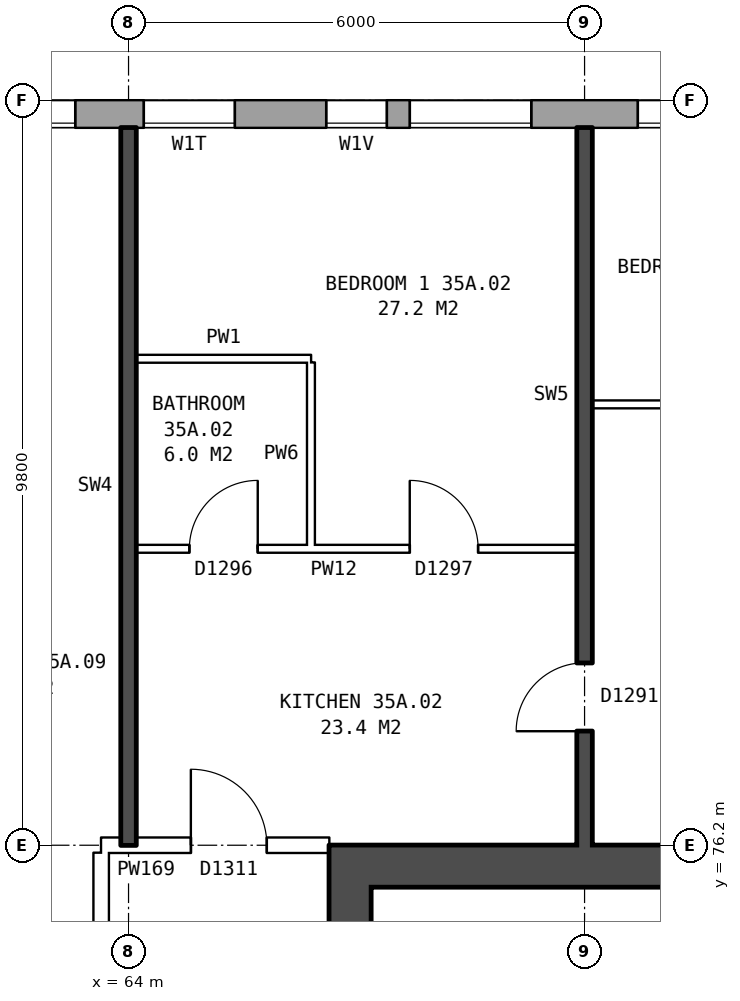
"""IFC4 building model, lengths in metres.
Left out: names, types, materials, properties, quantities, classifications, styles, units other than length and angle.
Written with IfcOpenShell. Run it as: python <this file> out.ifc"""

import sys

from ifc_helpers import new_model, si_unit, direction, frame, frame_2d, origin, place, context, subcontext, project, spatial, rectangle, extrude, element, fill, save


model = new_model("IFC4")
c1 = context("Model", 3, precision=1e-05, world=origin(), true_north=direction((0.0, 1.0)))
c2 = subcontext(c1, "Body", "Model", "MODEL_VIEW")
j1 = project(units=[si_unit("LENGTHUNIT", "METRE"), si_unit("PLANEANGLEUNIT", "RADIAN")], contexts=[c1])
p1 = place(None, origin())
s1 = spatial("IfcSite", under=j1, at=p1, CompositionType="ELEMENT")
p2 = place(p1, origin())
s2 = spatial("IfcBuilding", under=s1, at=p2, CompositionType="ELEMENT")
p3 = place(p2, frame((0.0, 0.0, 126.8)))
s3 = spatial("IfcBuildingStorey", under=s2, at=p3, CompositionType="ELEMENT", Elevation=126.8)
p4 = place(p3, frame((72.925, 85.82, 0.0), z_axis=(0.0, 0.0, 1.0), x_axis=(-1.0, 0.0, 0.0)))
e1 = element("IfcWall", 1, at=p4, inside=s3, PredefinedType="STANDARD", context=c2, shape_type="SweptSolid", body=[
    extrude(rectangle(XDim=43.101, YDim=0.36, at=frame_2d((21.55, 0.0))), origin(), (0.0, 0.0, 1.0), 2.85),
])
p5 = place(p4, frame((0.625, 0.0, 0.8)))
e2 = element("IfcOpeningElement", 2, at=p5, cuts=e1, PredefinedType="OPENING", context=c2, shape_type="SweptSolid", body=[
    extrude(rectangle(XDim=1.6, YDim=1.8, at=frame_2d((0.8, 0.9))), frame((0.0, 0.19, 0.0), z_axis=(0.0, -1.0, 0.0), x_axis=(1.0, 0.0, 0.0)), (0.0, 0.0, 1.0), 0.38),
])
p6 = place(p4, frame((3.625, 0.0, 0.8)))
e3 = element("IfcOpeningElement", 3, at=p6, cuts=e1, PredefinedType="OPENING", context=c2, shape_type="SweptSolid", body=[
    extrude(rectangle(XDim=1.6, YDim=1.8, at=frame_2d((0.8, 0.9))), frame((0.0, 0.19, 0.0), z_axis=(0.0, -1.0, 0.0), x_axis=(1.0, 0.0, 0.0)), (0.0, 0.0, 1.0), 0.38),
])
p7 = place(p4, frame((5.525, 0.0, 1.7)))
e4 = element("IfcOpeningElement", 4, at=p7, cuts=e1, PredefinedType="OPENING", context=c2, shape_type="SweptSolid", body=[
    extrude(rectangle(XDim=0.8, YDim=0.9, at=frame_2d((0.4, 0.45))), frame((0.0, 0.19, 0.0), z_axis=(0.0, -1.0, 0.0), x_axis=(1.0, 0.0, 0.0)), (0.0, 0.0, 1.0), 0.38),
])
p8 = place(p4, frame((9.625, 0.0, 0.8)))
e5 = element("IfcOpeningElement", 5, at=p8, cuts=e1, PredefinedType="OPENING", context=c2, shape_type="SweptSolid", body=[
    extrude(rectangle(XDim=1.6, YDim=1.8, at=frame_2d((0.8, 0.9))), frame((0.0, 0.19, 0.0), z_axis=(0.0, -1.0, 0.0), x_axis=(1.0, 0.0, 0.0)), (0.0, 0.0, 1.0), 0.38),
])
p9 = place(p4, frame((12.625, 0.0, 0.8)))
e6 = element("IfcOpeningElement", 6, at=p9, cuts=e1, PredefinedType="OPENING", context=c2, shape_type="SweptSolid", body=[
    extrude(rectangle(XDim=1.6, YDim=1.8, at=frame_2d((0.8, 0.9))), frame((0.0, 0.19, 0.0), z_axis=(0.0, -1.0, 0.0), x_axis=(1.0, 0.0, 0.0)), (0.0, 0.0, 1.0), 0.38),
])
p10 = place(p4, frame((15.625, 0.0, 0.8)))
e7 = element("IfcOpeningElement", 7, at=p10, cuts=e1, PredefinedType="OPENING", context=c2, shape_type="SweptSolid", body=[
    extrude(rectangle(XDim=1.6, YDim=1.8, at=frame_2d((0.8, 0.9))), frame((0.0, 0.19, 0.0), z_axis=(0.0, -1.0, 0.0), x_axis=(1.0, 0.0, 0.0)), (0.0, 0.0, 1.0), 0.38),
])
p11 = place(p4, frame((18.625, 0.0, 0.8)))
e8 = element("IfcOpeningElement", 8, at=p11, cuts=e1, PredefinedType="OPENING", context=c2, shape_type="SweptSolid", body=[
    extrude(rectangle(XDim=1.6, YDim=1.8, at=frame_2d((0.8, 0.9))), frame((0.0, 0.19, 0.0), z_axis=(0.0, -1.0, 0.0), x_axis=(1.0, 0.0, 0.0)), (0.0, 0.0, 1.0), 0.38),
])
p12 = place(p4, frame((21.625, 0.0, 0.8)))
e9 = element("IfcOpeningElement", 9, at=p12, cuts=e1, PredefinedType="OPENING", context=c2, shape_type="SweptSolid", body=[
    extrude(rectangle(XDim=1.6, YDim=1.8, at=frame_2d((0.8, 0.9))), frame((0.0, 0.19, 0.0), z_axis=(0.0, -1.0, 0.0), x_axis=(1.0, 0.0, 0.0)), (0.0, 0.0, 1.0), 0.38),
])
p13 = place(p4, frame((24.625, 0.0, 0.8)))
e10 = element("IfcOpeningElement", 10, at=p13, cuts=e1, PredefinedType="OPENING", context=c2, shape_type="SweptSolid", body=[
    extrude(rectangle(XDim=1.6, YDim=1.8, at=frame_2d((0.8, 0.9))), frame((0.0, 0.19, 0.0), z_axis=(0.0, -1.0, 0.0), x_axis=(1.0, 0.0, 0.0)), (0.0, 0.0, 1.0), 0.38),
])
p14 = place(p4, frame((27.625, 0.0, 0.8)))
e11 = element("IfcOpeningElement", 11, at=p14, cuts=e1, PredefinedType="OPENING", context=c2, shape_type="SweptSolid", body=[
    extrude(rectangle(XDim=1.6, YDim=1.8, at=frame_2d((0.8, 0.9))), frame((0.0, 0.19, 0.0), z_axis=(0.0, -1.0, 0.0), x_axis=(1.0, 0.0, 0.0)), (0.0, 0.0, 1.0), 0.38),
])
p15 = place(p4, frame((30.625, 0.0, 0.8)))
e12 = element("IfcOpeningElement", 12, at=p15, cuts=e1, PredefinedType="OPENING", context=c2, shape_type="SweptSolid", body=[
    extrude(rectangle(XDim=1.6, YDim=1.8, at=frame_2d((0.8, 0.9))), frame((0.0, 0.19, 0.0), z_axis=(0.0, -1.0, 0.0), x_axis=(1.0, 0.0, 0.0)), (0.0, 0.0, 1.0), 0.38),
])
p16 = place(p4, frame((33.125, 0.0, 0.8)))
e13 = element("IfcOpeningElement", 13, at=p16, cuts=e1, PredefinedType="OPENING", context=c2, shape_type="SweptSolid", body=[
    extrude(rectangle(XDim=1.4, YDim=1.8, at=frame_2d((0.7, 0.9))), frame((0.0, 0.19, 0.0), z_axis=(0.0, -1.0, 0.0), x_axis=(1.0, 0.0, 0.0)), (0.0, 0.0, 1.0), 0.38),
])
p17 = place(p4, frame((34.825, 0.0, 0.8)))
e14 = element("IfcOpeningElement", 14, at=p17, cuts=e1, PredefinedType="OPENING", context=c2, shape_type="SweptSolid", body=[
    extrude(rectangle(XDim=0.6, YDim=0.9, at=frame_2d((0.3, 0.45))), frame((0.0, 0.19, 0.0), z_axis=(0.0, -1.0, 0.0), x_axis=(1.0, 0.0, 0.0)), (0.0, 0.0, 1.0), 0.38),
])
p18 = place(p4, frame((39.625, 0.0, 0.8)))
e15 = element("IfcOpeningElement", 15, at=p18, cuts=e1, PredefinedType="OPENING", context=c2, shape_type="SweptSolid", body=[
    extrude(rectangle(XDim=1.6, YDim=1.8, at=frame_2d((0.8, 0.9))), frame((0.0, 0.19, 0.0), z_axis=(0.0, -1.0, 0.0), x_axis=(1.0, 0.0, 0.0)), (0.0, 0.0, 1.0), 0.38),
])
p19 = place(p4, frame((7.525, 0.0, 0.8)))
e16 = element("IfcOpeningElement", 16, at=p19, cuts=e1, PredefinedType="OPENING", context=c2, shape_type="SweptSolid", body=[
    extrude(rectangle(XDim=1.2, YDim=0.9, at=frame_2d((0.6, 0.45))), frame((0.0, 0.19, 0.0), z_axis=(0.0, -1.0, 0.0), x_axis=(1.0, 0.0, 0.0)), (0.0, 0.0, 1.0), 0.38),
])
p20 = place(p4, frame((36.725, 0.0, 1.7)))
e17 = element("IfcOpeningElement", 17, at=p20, cuts=e1, PredefinedType="OPENING", context=c2, shape_type="SweptSolid", body=[
    extrude(rectangle(XDim=0.6, YDim=0.9, at=frame_2d((0.3, 0.45))), frame((0.0, 0.19, 0.0), z_axis=(0.0, -1.0, 0.0), x_axis=(1.0, 0.0, 0.0)), (0.0, 0.0, 1.0), 0.38),
])
p21 = place(p4, frame((37.725, 0.0, 0.8)))
e18 = element("IfcOpeningElement", 18, at=p21, cuts=e1, PredefinedType="OPENING", context=c2, shape_type="SweptSolid", body=[
    extrude(rectangle(XDim=1.0, YDim=1.8, at=frame_2d((0.5, 0.9))), frame((0.0, 0.19, 0.0), z_axis=(0.0, -1.0, 0.0), x_axis=(1.0, 0.0, 0.0)), (0.0, 0.0, 1.0), 0.38),
])
p22 = place(p3, frame((66.915, 63.8, 0.0), z_axis=(0.0, 0.0, 1.0), x_axis=(0.0, 1.0, 0.0)))
e19 = element("IfcWall", 19, at=p22, inside=s3, PredefinedType="SHEAR", context=c2, shape_type="SweptSolid", body=[
    extrude(rectangle(XDim=12.4, YDim=0.55, at=frame_2d((6.2, 0.0))), origin(), (0.0, 0.0, 1.0), 2.85),
])
p23 = place(p22, frame((1.325, 0.0, 0.0)))
e20 = element("IfcOpeningElement", 20, at=p23, cuts=e19, PredefinedType="OPENING", context=c2, shape_type="SweptSolid", body=[
    extrude(rectangle(XDim=1.1, YDim=2.1, at=frame_2d((0.55, 1.05))), frame((0.0, 0.285, 0.0), z_axis=(0.0, -1.0, 0.0), x_axis=(1.0, 0.0, 0.0)), (0.0, 0.0, 1.0), 0.57),
])
p24 = place(p22, frame((3.6, 0.0, 0.0)))
e21 = element("IfcOpeningElement", 21, at=p24, cuts=e19, PredefinedType="OPENING", context=c2, shape_type="SweptSolid", body=[
    extrude(rectangle(XDim=1.1, YDim=2.1, at=frame_2d((0.55, 1.05))), frame((0.0, 0.285, 0.0), z_axis=(0.0, -1.0, 0.0), x_axis=(1.0, 0.0, 0.0)), (0.0, 0.0, 1.0), 0.57),
])
p25 = place(p22, frame((5.8, 0.0, 0.0)))
e22 = element("IfcOpeningElement", 22, at=p25, cuts=e19, PredefinedType="OPENING", context=c2, shape_type="SweptSolid", body=[
    extrude(rectangle(XDim=1.1, YDim=2.1, at=frame_2d((0.55, 1.05))), frame((0.0, 0.285, 0.0), z_axis=(0.0, -1.0, 0.0), x_axis=(1.0, 0.0, 0.0)), (0.0, 0.0, 1.0), 0.57),
])
p26 = place(p22, frame((8.0, 0.0, 0.0)))
e23 = element("IfcOpeningElement", 23, at=p26, cuts=e19, PredefinedType="OPENING", context=c2, shape_type="SweptSolid", body=[
    extrude(rectangle(XDim=1.1, YDim=2.1, at=frame_2d((0.55, 1.05))), frame((0.0, 0.285, 0.0), z_axis=(0.0, -1.0, 0.0), x_axis=(1.0, 0.0, 0.0)), (0.0, 0.0, 1.0), 0.57),
])
p27 = place(p22, frame((9.9, 0.0, 0.0)))
e24 = element("IfcOpeningElement", 24, at=p27, cuts=e19, PredefinedType="OPENING", context=c2, shape_type="SweptSolid", body=[
    extrude(rectangle(XDim=1.1, YDim=2.1, at=frame_2d((0.55, 1.05))), frame((0.0, 0.285, 0.0), z_axis=(0.0, -1.0, 0.0), x_axis=(1.0, 0.0, 0.0)), (0.0, 0.0, 1.0), 0.57),
])
p28 = place(p3, frame((67.19, 75.925, 0.0), z_axis=(0.0, 0.0, 1.0), x_axis=(1.0, 0.0, 0.0)))
e25 = element("IfcWall", 25, at=p28, inside=s3, PredefinedType="SHEAR", context=c2, shape_type="SweptSolid", body=[
    extrude(rectangle(XDim=7.9, YDim=0.55, at=frame_2d((3.95, 0.0))), origin(), (0.0, 0.0, 1.0), 2.85),
])
p29 = place(p3, frame((63.64, 63.9, 0.0), z_axis=(0.0, 0.0, 1.0), x_axis=(0.0, 1.0, 0.0)))
e26 = element("IfcWall", 26, at=p29, inside=s3, PredefinedType="PARTITIONING", context=c2, shape_type="SweptSolid", body=[
    extrude(rectangle(XDim=12.2, YDim=0.2, at=frame_2d((6.1, 0.0))), origin(), (0.0, 0.0, 1.0), 2.85),
])
p30 = place(p29, frame((5.1, 0.0, 0.0)))
e27 = element("IfcOpeningElement", 27, at=p30, cuts=e26, PredefinedType="OPENING", context=c2, shape_type="SweptSolid", body=[
    extrude(rectangle(XDim=2.0, YDim=2.1, at=frame_2d((1.0, 1.05))), frame((0.0, 0.11, 0.0), z_axis=(0.0, -1.0, 0.0), x_axis=(1.0, 0.0, 0.0)), (0.0, 0.0, 1.0), 0.22),
])
p31 = place(p3, frame((63.64, 76.2, 0.0), z_axis=(0.0, 0.0, 1.0), x_axis=(1.0, 0.0, 0.0)))
e28 = element("IfcWall", 28, at=p31, inside=s3, PredefinedType="PARTITIONING", context=c2, shape_type="SweptSolid", body=[
    extrude(rectangle(XDim=3.0, YDim=0.2, at=frame_2d((1.5, 0.0))), origin(), (0.0, 0.0, 1.0), 2.85),
])
p32 = place(p31, frame((1.18, 0.0, 0.0)))
e29 = element("IfcOpeningElement", 29, at=p32, cuts=e28, PredefinedType="OPENING", context=c2, shape_type="SweptSolid", body=[
    extrude(rectangle(XDim=1.0, YDim=2.1, at=frame_2d((0.5, 1.05))), frame((0.0, 0.11, 0.0), z_axis=(0.0, -1.0, 0.0), x_axis=(1.0, 0.0, 0.0)), (0.0, 0.0, 1.0), 0.22),
])
p33 = place(p3, frame((64.1, 80.1, 0.0), z_axis=(0.0, 0.0, 1.0), x_axis=(1.0, 0.0, 0.0)))
e30 = element("IfcWall", 30, at=p33, inside=s3, PredefinedType="PARTITIONING", context=c2, shape_type="SweptSolid", body=[
    extrude(rectangle(XDim=5.8, YDim=0.1, at=frame_2d((2.9, 0.0))), origin(), (0.0, 0.0, 1.0), 2.85),
])
p34 = place(p33, frame((3.6, 0.0, 0.0)))
e31 = element("IfcOpeningElement", 31, at=p34, cuts=e30, PredefinedType="OPENING", context=c2, shape_type="SweptSolid", body=[
    extrude(rectangle(XDim=0.9, YDim=2.1, at=frame_2d((0.45, 1.05))), frame((0.0, 0.06, 0.0), z_axis=(0.0, -1.0, 0.0), x_axis=(1.0, 0.0, 0.0)), (0.0, 0.0, 1.0), 0.12),
])
p35 = place(p33, frame((0.7, 0.0, 0.0)))
e32 = element("IfcOpeningElement", 32, at=p35, cuts=e30, PredefinedType="OPENING", context=c2, shape_type="SweptSolid", body=[
    extrude(rectangle(XDim=0.9, YDim=2.1, at=frame_2d((0.45, 1.05))), frame((0.0, 0.06, 0.0), z_axis=(0.0, -1.0, 0.0), x_axis=(1.0, 0.0, 0.0)), (0.0, 0.0, 1.0), 0.12),
])
p36 = place(p3, frame((70.1, 82.0, 0.0), z_axis=(0.0, 0.0, 1.0), x_axis=(1.0, 0.0, 0.0)))
e33 = element("IfcWall", 33, at=p36, inside=s3, PredefinedType="PARTITIONING", context=c2, shape_type="SweptSolid", body=[
    extrude(rectangle(XDim=5.54, YDim=0.1, at=frame_2d((2.77, 0.0))), origin(), (0.0, 0.0, 1.0), 2.85),
])
p37 = place(p36, frame((2.32, 0.0, 0.0)))
e34 = element("IfcOpeningElement", 34, at=p37, cuts=e33, PredefinedType="OPENING", context=c2, shape_type="SweptSolid", body=[
    extrude(rectangle(XDim=0.9, YDim=2.1, at=frame_2d((0.45, 1.05))), frame((0.0, 0.06, 0.0), z_axis=(0.0, -1.0, 0.0), x_axis=(1.0, 0.0, 0.0)), (0.0, 0.0, 1.0), 0.12),
])
p38 = place(p3, frame((64.1, 82.6, 0.0), z_axis=(0.0, 0.0, 1.0), x_axis=(1.0, 0.0, 0.0)))
e35 = element("IfcWall", 35, at=p38, inside=s3, PredefinedType="PARTITIONING", context=c2, shape_type="SweptSolid", body=[
    extrude(rectangle(XDim=2.3, YDim=0.1, at=frame_2d((1.15, 0.0))), origin(), (0.0, 0.0, 1.0), 2.85),
])
p39 = place(p3, frame((64.0, 76.2, 0.0), z_axis=(0.0, 0.0, 1.0), x_axis=(0.0, 1.0, 0.0)))
e36 = element("IfcWall", 36, at=p39, inside=s3, PredefinedType="SOLIDWALL", context=c2, shape_type="SweptSolid", body=[
    extrude(rectangle(XDim=9.44, YDim=0.2, at=frame_2d((4.72, 0.0))), origin(), (0.0, 0.0, 1.0), 2.85),
])
p40 = place(p3, frame((66.4, 80.15, 0.0), z_axis=(0.0, 0.0, 1.0), x_axis=(0.0, 1.0, 0.0)))
e37 = element("IfcWall", 37, at=p40, inside=s3, PredefinedType="PARTITIONING", context=c2, shape_type="SweptSolid", body=[
    extrude(rectangle(XDim=2.4, YDim=0.1, at=frame_2d((1.2, 0.0))), origin(), (0.0, 0.0, 1.0), 2.85),
])
p41 = place(p3, frame((70.0, 76.2, 0.0), z_axis=(0.0, 0.0, 1.0), x_axis=(0.0, 1.0, 0.0)))
e38 = element("IfcWall", 38, at=p41, inside=s3, PredefinedType="SOLIDWALL", context=c2, shape_type="SweptSolid", body=[
    extrude(rectangle(XDim=9.44, YDim=0.2, at=frame_2d((4.72, 0.0))), origin(), (0.0, 0.0, 1.0), 2.85),
])
p42 = place(p41, frame((1.5, 0.0, 0.0)))
e39 = element("IfcOpeningElement", 39, at=p42, cuts=e38, PredefinedType="OPENING", context=c2, shape_type="SweptSolid", body=[
    extrude(rectangle(XDim=0.9, YDim=2.1, at=frame_2d((0.45, 1.05))), frame((0.0, 0.11, 0.0), z_axis=(0.0, -1.0, 0.0), x_axis=(1.0, 0.0, 0.0)), (0.0, 0.0, 1.0), 0.22),
])
p43 = place(p5, origin())
e40 = element("IfcWindow", 40, at=p43, inside=s3, PartitioningType="SINGLE_PANEL", PredefinedType="WINDOW", context=c2, shape_type="SweptSolid", body=[
    extrude(rectangle(XDim=1.6, YDim=1.8, at=frame_2d((0.8, 0.9))), frame((0.0, 0.15, 0.0), z_axis=(0.0, -1.0, 0.0), x_axis=(1.0, 0.0, 0.0)), (0.0, 0.0, 1.0), 0.06),
])
fill(e2, e40)
p44 = place(p6, origin())
e41 = element("IfcWindow", 41, at=p44, inside=s3, PartitioningType="SINGLE_PANEL", PredefinedType="WINDOW", context=c2, shape_type="SweptSolid", body=[
    extrude(rectangle(XDim=1.6, YDim=1.8, at=frame_2d((0.8, 0.9))), frame((0.0, 0.15, 0.0), z_axis=(0.0, -1.0, 0.0), x_axis=(1.0, 0.0, 0.0)), (0.0, 0.0, 1.0), 0.06),
])
fill(e3, e41)
p45 = place(p7, origin())
e42 = element("IfcWindow", 42, at=p45, inside=s3, PartitioningType="SINGLE_PANEL", PredefinedType="WINDOW", context=c2, shape_type="SweptSolid", body=[
    extrude(rectangle(XDim=0.8, YDim=0.9, at=frame_2d((0.4, 0.45))), frame((0.0, 0.15, 0.0), z_axis=(0.0, -1.0, 0.0), x_axis=(1.0, 0.0, 0.0)), (0.0, 0.0, 1.0), 0.06),
])
fill(e4, e42)
p46 = place(p8, origin())
e43 = element("IfcWindow", 43, at=p46, inside=s3, PartitioningType="SINGLE_PANEL", PredefinedType="WINDOW", context=c2, shape_type="SweptSolid", body=[
    extrude(rectangle(XDim=1.6, YDim=1.8, at=frame_2d((0.8, 0.9))), frame((0.0, 0.15, 0.0), z_axis=(0.0, -1.0, 0.0), x_axis=(1.0, 0.0, 0.0)), (0.0, 0.0, 1.0), 0.06),
])
fill(e5, e43)
p47 = place(p34, origin())
e44 = element("IfcDoor", 44, at=p47, inside=s3, OperationType="SINGLE_SWING_LEFT", PredefinedType="DOOR", context=c2, shape_type="SweptSolid", body=[
    extrude(rectangle(XDim=0.9, YDim=2.1, at=frame_2d((0.45, 1.05))), frame((0.0, 0.025, 0.0), z_axis=(0.0, -1.0, 0.0), x_axis=(1.0, 0.0, 0.0)), (0.0, 0.0, 1.0), 0.05),
])
fill(e31, e44)
p48 = place(p32, origin())
e45 = element("IfcDoor", 45, at=p48, inside=s3, OperationType="SINGLE_SWING_LEFT", PredefinedType="DOOR", context=c2, shape_type="SweptSolid", body=[
    extrude(rectangle(XDim=1.0, YDim=2.1, at=frame_2d((0.5, 1.05))), frame((0.0, 0.025, 0.0), z_axis=(0.0, -1.0, 0.0), x_axis=(1.0, 0.0, 0.0)), (0.0, 0.0, 1.0), 0.05),
])
fill(e29, e45)
p49 = place(p42, origin())
e46 = element("IfcDoor", 46, at=p49, inside=s3, OperationType="SINGLE_SWING_LEFT", PredefinedType="DOOR", context=c2, shape_type="SweptSolid", body=[
    extrude(rectangle(XDim=0.9, YDim=2.1, at=frame_2d((0.45, 1.05))), frame((0.0, 0.025, 0.0), z_axis=(0.0, -1.0, 0.0), x_axis=(1.0, 0.0, 0.0)), (0.0, 0.0, 1.0), 0.05),
])
fill(e39, e46)
p50 = place(p35, origin())
e47 = element("IfcDoor", 47, at=p50, inside=s3, OperationType="SINGLE_SWING_RIGHT", PredefinedType="DOOR", context=c2, shape_type="SweptSolid", body=[
    extrude(rectangle(XDim=0.9, YDim=2.1, at=frame_2d((0.45, 1.05))), frame((0.0, 0.025, 0.0), z_axis=(0.0, -1.0, 0.0), x_axis=(1.0, 0.0, 0.0)), (0.0, 0.0, 1.0), 0.05),
])
fill(e32, e47)
p51 = place(p19, origin())
e48 = element("IfcWindow", 48, at=p51, inside=s3, PartitioningType="SINGLE_PANEL", PredefinedType="WINDOW", context=c2, shape_type="SweptSolid", body=[
    extrude(rectangle(XDim=1.2, YDim=0.9, at=frame_2d((0.6, 0.45))), frame((0.0, 0.15, 0.0), z_axis=(0.0, -1.0, 0.0), x_axis=(1.0, 0.0, 0.0)), (0.0, 0.0, 1.0), 0.06),
])
fill(e16, e48)
save(model, sys.argv[1])
